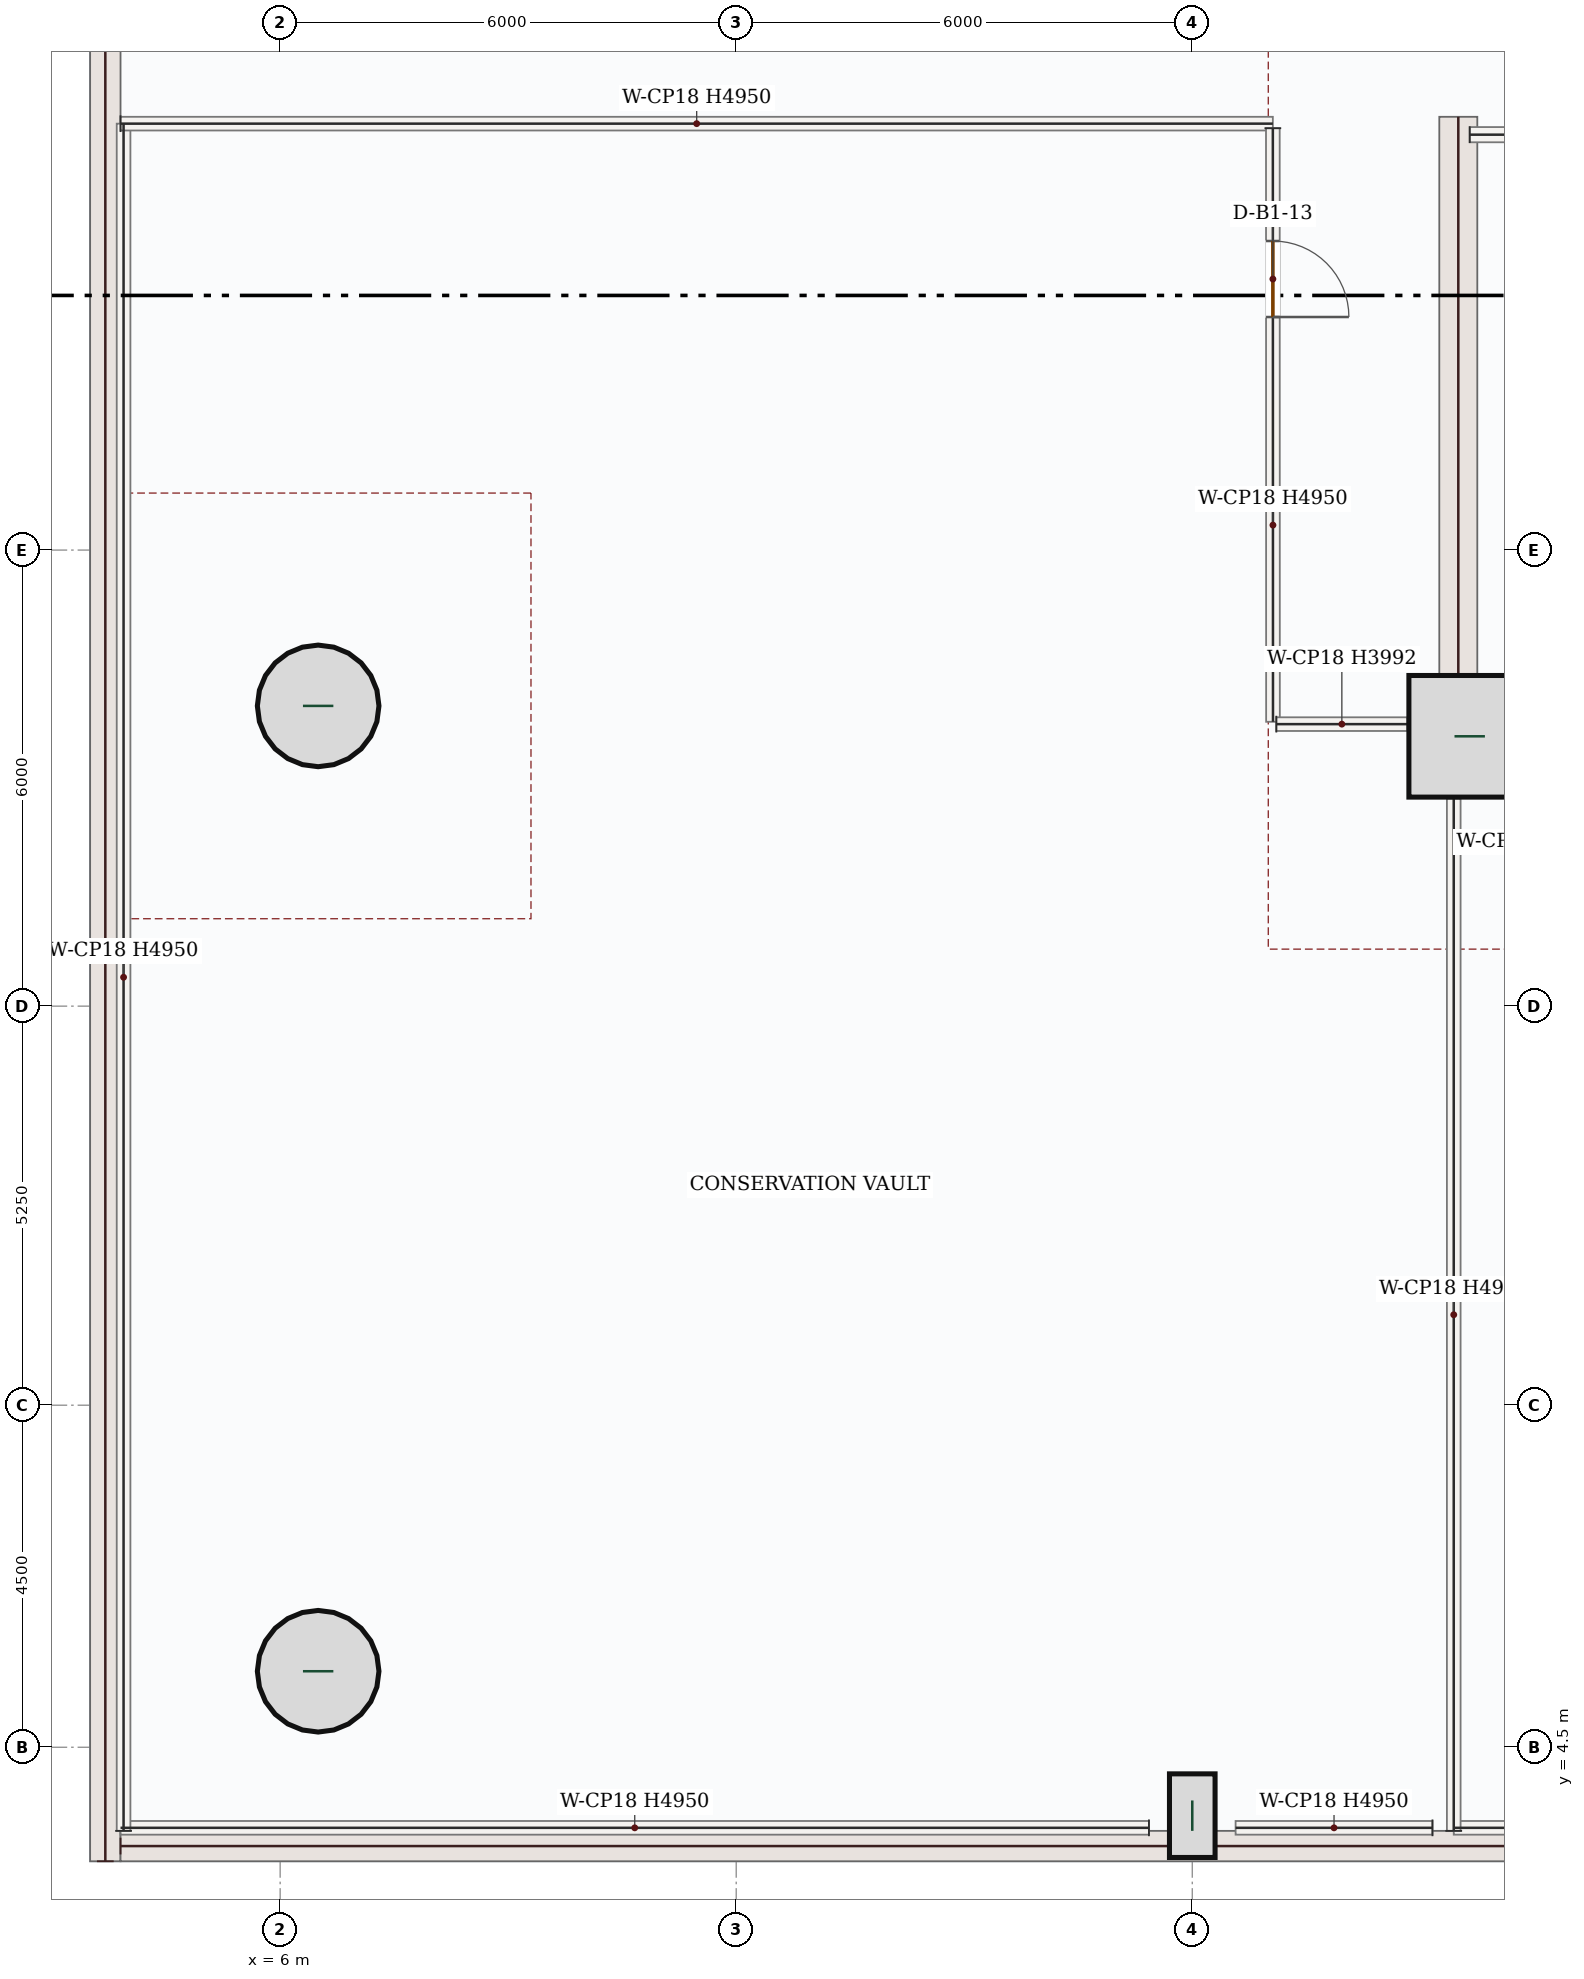
"""IFC4 building model, lengths in metres.
Left out: names, types, materials, properties, quantities, classifications, styles, units other than length and angle.
Written with IfcOpenShell. Run it as: python <this file> out.ifc"""

import sys

from ifc_helpers import new_model, si_unit, direction, frame, frame_2d, origin, origin_2d, place, context, subcontext, project, spatial, rectangle, hollow_circle, extrude, source, transform, mapped, element, fill, save


model = new_model("IFC4")
c1 = context("Model", 3, precision=1e-05, world=origin(), true_north=direction((0.0, 1.0)))
c2 = subcontext(c1, "Body", "Model", "MODEL_VIEW")
j1 = project(units=[si_unit("LENGTHUNIT", "METRE"), si_unit("PLANEANGLEUNIT", "RADIAN")], contexts=[c1])
p1 = place(None, origin())
s1 = spatial("IfcSite", under=j1, at=p1, CompositionType="ELEMENT")
p2 = place(p1, origin())
s2 = spatial("IfcBuilding", under=s1, at=p2, CompositionType="ELEMENT")
p3 = place(p2, frame((0.0, 0.0, -5.4)))
s3 = spatial("IfcBuildingStorey", under=s2, at=p3, CompositionType="ELEMENT", Elevation=-5.4)
m1 = source(origin(), c2, "Body", "SweptSolid", [
    extrude(rectangle(XDim=48.0, YDim=0.4, at=frame_2d((24.0, 0.0))), origin(), (0.0, 0.0, 1.0), 5.05),
])
p4 = place(p3, frame((3.7, 3.0, 0.0), z_axis=(0.0, 0.0, 1.0), x_axis=(0.0, 1.0, 0.0)))
e1 = element("IfcWall", 1, at=p4, inside=s3, PredefinedType="SHEAR", context=c2, shape_type="MappedRepresentation", body=[
    mapped(m1, transform((0.0, 0.0, 0.0), x_axis=(1.0, 0.0, 0.0), y_axis=(0.0, 1.0, 0.0), z_axis=(0.0, 0.0, 1.0), scale=1.0)),
])
m2 = source(origin(), c2, "Body", "SweptSolid", [
    extrude(rectangle(XDim=64.2, YDim=0.4, at=frame_2d((32.1, 0.0))), origin(), (0.0, 0.0, 1.0), 5.05),
])
p5 = place(p3, frame((3.9, 3.2, 0.0), z_axis=(0.0, 0.0, 1.0), x_axis=(1.0, 0.0, 0.0)))
e2 = element("IfcWall", 2, at=p5, inside=s3, PredefinedType="SHEAR", context=c2, shape_type="MappedRepresentation", body=[
    mapped(m2, transform((0.0, 0.0, 0.0), x_axis=(1.0, 0.0, 0.0), y_axis=(0.0, 1.0, 0.0), z_axis=(0.0, 0.0, 1.0), scale=1.0)),
])
m3 = source(origin(), c2, "Body", "SweptSolid", [
    extrude(rectangle(XDim=8.55, YDim=0.5, at=frame_2d((4.275, 0.0))), origin(), (0.0, 0.0, 1.0), 4.95),
])
p6 = place(p3, frame((21.5, 17.4, 0.0), z_axis=(0.0, 0.0, 1.0), x_axis=(0.0, 1.0, 0.0)))
e3 = element("IfcWall", 3, at=p6, inside=s3, PredefinedType="SHEAR", context=c2, shape_type="MappedRepresentation", body=[
    mapped(m3, transform((0.0, 0.0, 0.0), x_axis=(1.0, 0.0, 0.0), y_axis=(0.0, 1.0, 0.0), z_axis=(0.0, 0.0, 1.0), scale=1.0)),
])
m4 = source(origin(), c2, "Body", "SweptSolid", [
    extrude(rectangle(XDim=7.0, YDim=0.5, at=frame_2d((3.5, 0.0))), origin(), (0.0, 0.0, 1.0), 4.95),
])
p7 = place(p3, frame((21.75, 17.65, 0.0), z_axis=(0.0, 0.0, 1.0), x_axis=(1.0, 0.0, 0.0)))
e4 = element("IfcWall", 4, at=p7, inside=s3, PredefinedType="SHEAR", context=c2, shape_type="MappedRepresentation", body=[
    mapped(m4, transform((0.0, 0.0, 0.0), x_axis=(1.0, 0.0, 0.0), y_axis=(0.0, 1.0, 0.0), z_axis=(0.0, 0.0, 1.0), scale=1.0)),
])
m5 = source(origin(), c2, "Body", "SweptSolid", [
    extrude(rectangle(XDim=1.6, YDim=1.6, at=origin_2d()), origin(), (0.0, 0.0, 1.0), 5.4),
])
p8 = place(p3, frame((21.65, 17.8, 0.0), z_axis=(0.0, 0.0, 1.0), x_axis=(1.0, 0.0, 0.0)))
e5 = element("IfcColumn", 5, at=p8, inside=s3, PredefinedType="COLUMN", context=c2, shape_type="MappedRepresentation", body=[
    mapped(m5, transform((0.0, 0.0, 0.0), x_axis=(1.0, 0.0, 0.0), y_axis=(0.0, 1.0, 0.0), z_axis=(0.0, 0.0, 1.0), scale=1.0)),
])
m6 = source(origin(), c2, "Body", "SweptSolid", [
    extrude(hollow_circle(Radius=0.8, WallThickness=0.06, at=origin_2d()), origin(), (0.0, 0.0, 1.0), 5.4),
])
for number, where, z_axis, x_axis in (
    (6, (6.5, 5.5, 0.0), (0.0, 0.0, 1.0), (1.0, 0.0, 0.0)),
    (7, (6.5, 18.2, 0.0), (0.0, 0.0, 1.0), (1.0, 0.0, 0.0)),
):
    element("IfcColumn", number, at=place(p3, frame(where, z_axis=z_axis, x_axis=x_axis)), inside=s3, PredefinedType="COLUMN", context=c2, shape_type="MappedRepresentation", body=[
        mapped(m6, transform((0.0, 0.0, 0.0), x_axis=(1.0, 0.0, 0.0), y_axis=(0.0, 1.0, 0.0), z_axis=(0.0, 0.0, 1.0), scale=1.0)),
    ])
m7 = source(origin(), c2, "Body", "SweptSolid", [
    extrude(rectangle(XDim=0.6, YDim=1.1, at=origin_2d()), origin(), (0.0, 0.0, 1.0), 5.4),
])
p9 = place(p3, frame((18.0, 3.6, 0.0), z_axis=(0.0, 0.0, 1.0), x_axis=(1.0, 0.0, 0.0)))
e8 = element("IfcColumn", 8, at=p9, inside=s3, PredefinedType="PILASTER", context=c2, shape_type="MappedRepresentation", body=[
    mapped(m7, transform((0.0, 0.0, 0.0), x_axis=(1.0, 0.0, 0.0), y_axis=(0.0, 1.0, 0.0), z_axis=(0.0, 0.0, 1.0), scale=1.0)),
])
m8 = source(origin(), c2, "Body", "SweptSolid", [
    extrude(rectangle(XDim=4.25, YDim=0.2, at=frame_2d((2.125, 0.0))), origin(), (0.0, 0.0, 1.0), 4.95),
])
p10 = place(p3, frame((21.65, 25.715, 0.0), z_axis=(0.0, 0.0, 1.0), x_axis=(1.0, 0.0, 0.0)))
e9 = element("IfcWall", 9, at=p10, inside=s3, PredefinedType="SOLIDWALL", context=c2, shape_type="MappedRepresentation", body=[
    mapped(m8, transform((0.0, 0.0, 0.0), x_axis=(1.0, 0.0, 0.0), y_axis=(0.0, 1.0, 0.0), z_axis=(0.0, 0.0, 1.0), scale=1.0)),
])
m9 = source(origin(), c2, "Body", "SweptSolid", [
    extrude(rectangle(XDim=14.325, YDim=0.18, at=frame_2d((7.163, 0.0))), origin(), (0.0, 0.0, 1.0), 4.95),
])
p11 = place(p3, frame((35.765, 3.44, 0.0), z_axis=(0.0, 0.0, 1.0), x_axis=(-1.0, 0.0, 0.0)))
e10 = element("IfcWall", 10, at=p11, inside=s3, PredefinedType="PARTITIONING", context=c2, shape_type="MappedRepresentation", body=[
    mapped(m9, transform((0.0, 0.0, 0.0), x_axis=(1.0, 0.0, 0.0), y_axis=(0.0, 1.0, 0.0), z_axis=(0.0, 0.0, 1.0), scale=1.0)),
])
m10 = source(origin(), c2, "Body", "SweptSolid", [
    extrude(rectangle(XDim=13.58, YDim=0.18, at=frame_2d((6.79, 0.0))), origin(), (0.0, 0.0, 1.0), 4.95),
])
p12 = place(p3, frame((21.44, 3.4, 0.0), z_axis=(0.0, 0.0, 1.0), x_axis=(0.0, 1.0, 0.0)))
e11 = element("IfcWall", 11, at=p12, inside=s3, PredefinedType="PARTITIONING", context=c2, shape_type="MappedRepresentation", body=[
    mapped(m10, transform((0.0, 0.0, 0.0), x_axis=(1.0, 0.0, 0.0), y_axis=(0.0, 1.0, 0.0), z_axis=(0.0, 0.0, 1.0), scale=1.0)),
])
m11 = source(origin(), c2, "Body", "SweptSolid", [
    extrude(rectangle(XDim=2.59, YDim=0.18, at=frame_2d((1.295, 0.0))), origin(), (0.0, 0.0, 1.0), 4.95),
])
p13 = place(p3, frame((21.16, 3.44, 0.0), z_axis=(0.0, 0.0, 1.0), x_axis=(-1.0, 0.0, 0.0)))
e12 = element("IfcWall", 12, at=p13, inside=s3, PredefinedType="PARTITIONING", context=c2, shape_type="MappedRepresentation", body=[
    mapped(m11, transform((0.0, 0.0, 0.0), x_axis=(1.0, 0.0, 0.0), y_axis=(0.0, 1.0, 0.0), z_axis=(0.0, 0.0, 1.0), scale=1.0)),
])
m12 = source(origin(), c2, "Body", "SweptSolid", [
    extrude(rectangle(XDim=13.53, YDim=0.18, at=frame_2d((6.765, 0.0))), origin(), (0.0, 0.0, 1.0), 4.95),
])
p14 = place(p3, frame((17.43, 3.44, 0.0), z_axis=(0.0, 0.0, 1.0), x_axis=(-1.0, 0.0, 0.0)))
e13 = element("IfcWall", 13, at=p14, inside=s3, PredefinedType="PARTITIONING", context=c2, shape_type="MappedRepresentation", body=[
    mapped(m12, transform((0.0, 0.0, 0.0), x_axis=(1.0, 0.0, 0.0), y_axis=(0.0, 1.0, 0.0), z_axis=(0.0, 0.0, 1.0), scale=1.0)),
])
m13 = source(origin(), c2, "Body", "SweptSolid", [
    extrude(rectangle(XDim=22.46, YDim=0.18, at=frame_2d((11.23, 0.0))), origin(), (0.0, 0.0, 1.0), 4.95),
])
p15 = place(p3, frame((3.94, 3.4, 0.0), z_axis=(0.0, 0.0, 1.0), x_axis=(0.0, 1.0, 0.0)))
e14 = element("IfcWall", 14, at=p15, inside=s3, PredefinedType="PARTITIONING", context=c2, shape_type="MappedRepresentation", body=[
    mapped(m13, transform((0.0, 0.0, 0.0), x_axis=(1.0, 0.0, 0.0), y_axis=(0.0, 1.0, 0.0), z_axis=(0.0, 0.0, 1.0), scale=1.0)),
])
m14 = source(origin(), c2, "Body", "SweptSolid", [
    extrude(rectangle(XDim=15.16, YDim=0.18, at=frame_2d((7.58, 0.0))), origin(), (0.0, 0.0, 1.0), 4.95),
])
p16 = place(p3, frame((3.9, 25.86, 0.0), z_axis=(0.0, 0.0, 1.0), x_axis=(1.0, 0.0, 0.0)))
e15 = element("IfcWall", 15, at=p16, inside=s3, PredefinedType="PARTITIONING", context=c2, shape_type="MappedRepresentation", body=[
    mapped(m14, transform((0.0, 0.0, 0.0), x_axis=(1.0, 0.0, 0.0), y_axis=(0.0, 1.0, 0.0), z_axis=(0.0, 0.0, 1.0), scale=1.0)),
])
p17 = place(p3, frame((19.06, 25.8, 0.0), z_axis=(0.0, 0.0, 1.0), x_axis=(0.000250109415, -0.999999968723, 0.0)))
e16 = element("IfcWall", 16, at=p17, inside=s3, PredefinedType="PARTITIONING", context=c2, shape_type="SweptSolid", body=[
    extrude(rectangle(XDim=7.809, YDim=0.18, at=frame_2d((3.905, 0.0))), origin(), (0.0, 0.0, 1.0), 4.95),
])
p18 = place(p17, frame((1.484, 0.0, 0.0)))
e17 = element("IfcOpeningElement", 17, at=p18, cuts=e16, PredefinedType="OPENING", context=c2, shape_type="SweptSolid", body=[
    extrude(rectangle(XDim=1.0, YDim=2.15, at=frame_2d((0.5, 1.075))), frame((0.0, 0.1, 0.0), z_axis=(0.0, -1.0, 0.0), x_axis=(1.0, 0.0, 0.0)), (0.0, 0.0, 1.0), 0.2),
])
m15 = source(origin(), c2, "Body", "SweptSolid", [
    extrude(rectangle(XDim=1.724, YDim=0.18, at=frame_2d((0.862, 0.0))), origin(), (0.0, 0.0, 1.0), 3.992),
])
p19 = place(p3, frame((19.106, 17.96, 0.0), z_axis=(0.0, 0.0, 1.0), x_axis=(1.0, 0.0, 0.0)))
e18 = element("IfcWall", 18, at=p19, inside=s3, PredefinedType="PARTITIONING", context=c2, shape_type="MappedRepresentation", body=[
    mapped(m15, transform((0.0, 0.0, 0.0), x_axis=(1.0, 0.0, 0.0), y_axis=(0.0, 1.0, 0.0), z_axis=(0.0, 0.0, 1.0), scale=1.0)),
])
m16 = source(origin(), c2, "Body", "SweptSolid", [
    extrude(rectangle(XDim=1.0, YDim=2.15, at=frame_2d((0.5, 1.075))), frame((0.0, 0.025, 0.0), z_axis=(0.0, -1.0, 0.0), x_axis=(1.0, 0.0, 0.0)), (0.0, 0.0, 1.0), 0.05),
])
p20 = place(p18, origin())
e19 = element("IfcDoor", 19, at=p20, inside=s3, OperationType="SINGLE_SWING_RIGHT", PredefinedType="DOOR", context=c2, shape_type="MappedRepresentation", body=[
    mapped(m16, transform((0.0, 0.0, 0.0), x_axis=(1.0, 0.0, 0.0), y_axis=(0.0, 1.0, 0.0), z_axis=(0.0, 0.0, 1.0), scale=1.0)),
])
fill(e17, e19)
save(model, sys.argv[1])
